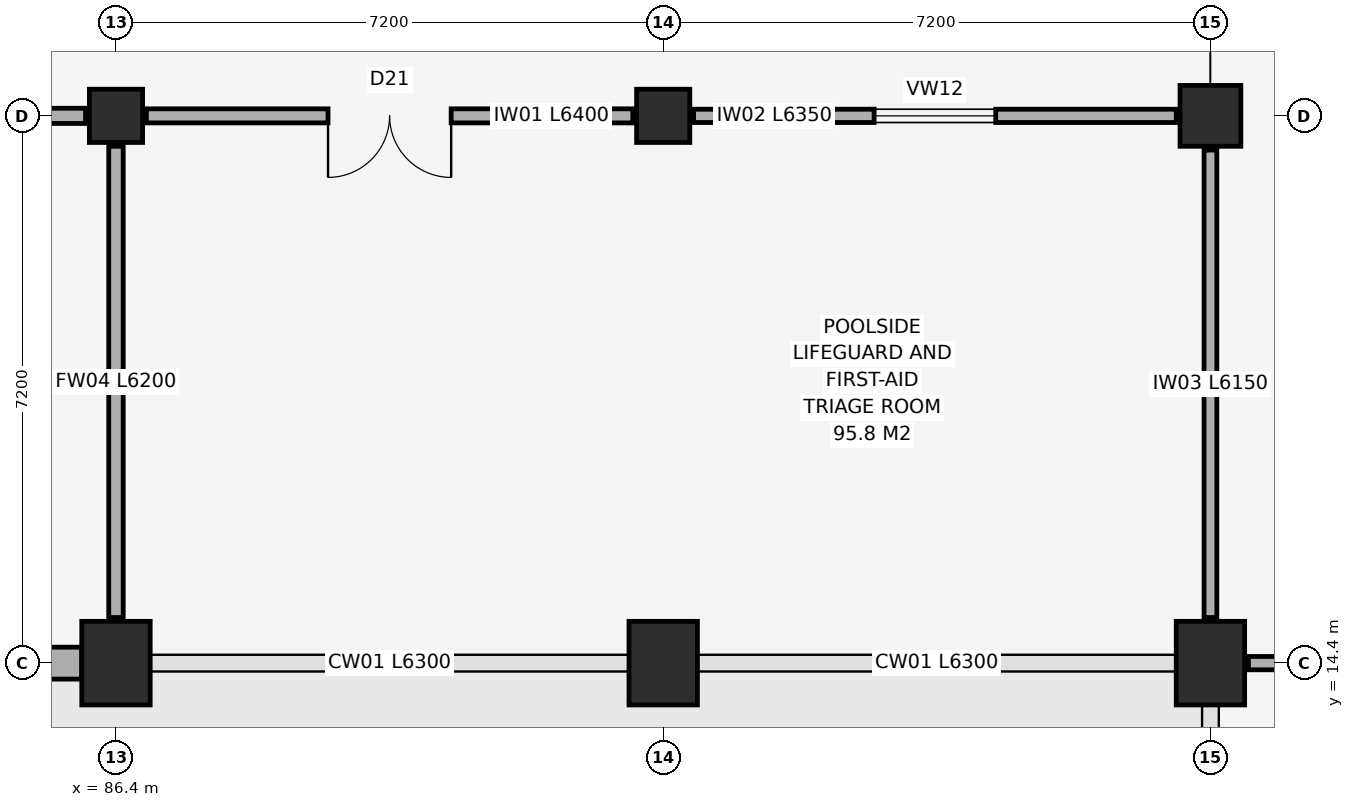
"""IFC4 building model, lengths in metres.
Left out: names, types, materials, properties, quantities, classifications, styles, units other than length and angle.
Written with IfcOpenShell. Run it as: python <this file> out.ifc"""

import sys

from ifc_helpers import new_model, si_unit, direction, frame, frame_2d, origin, origin_2d, place, context, subcontext, project, spatial, rectangle, circle, extrude, element, fill, save


model = new_model("IFC4")
c1 = context("Model", 3, precision=1e-05, world=origin(), true_north=direction((0.0, 1.0)))
c2 = subcontext(c1, "Body", "Model", "MODEL_VIEW")
j1 = project(units=[si_unit("LENGTHUNIT", "METRE"), si_unit("PLANEANGLEUNIT", "RADIAN")], contexts=[c1])
p1 = place(None, origin())
s1 = spatial("IfcSite", under=j1, at=p1, CompositionType="ELEMENT")
p2 = place(p1, origin())
s2 = spatial("IfcBuilding", under=s1, at=p2, CompositionType="ELEMENT")
p3 = place(p2, origin())
s3 = spatial("IfcBuildingStorey", under=s2, at=p3, CompositionType="ELEMENT", Elevation=0.0)
p4 = place(p3, frame((86.4, 14.4, 0.0), z_axis=(0.0, 0.0, 1.0), x_axis=(1.0, 0.0, 0.0)))
e1 = element("IfcColumn", 1, at=p4, inside=s3, PredefinedType="COLUMN", context=c2, shape_type="SweptSolid", body=[
    extrude(rectangle(XDim=0.9, YDim=1.1, at=origin_2d()), origin(), (0.0, 0.0, 1.0), 5.4),
])
p5 = place(p3, frame((86.4, 21.6, 0.0), z_axis=(0.0, 0.0, 1.0), x_axis=(1.0, 0.0, 0.0)))
e2 = element("IfcColumn", 2, at=p5, inside=s3, PredefinedType="COLUMN", context=c2, shape_type="SweptSolid", body=[
    extrude(rectangle(XDim=0.7, YDim=0.7, at=origin_2d()), origin(), (0.0, 0.0, 1.0), 5.4),
])
p6 = place(p3, frame((93.6, 14.4, 0.0), z_axis=(0.0, 0.0, 1.0), x_axis=(1.0, 0.0, 0.0)))
e3 = element("IfcColumn", 3, at=p6, inside=s3, PredefinedType="COLUMN", context=c2, shape_type="SweptSolid", body=[
    extrude(rectangle(XDim=0.9, YDim=1.1, at=origin_2d()), origin(), (0.0, 0.0, 1.0), 5.4),
])
p7 = place(p3, frame((93.6, 21.6, 0.0), z_axis=(0.0, 0.0, 1.0), x_axis=(1.0, 0.0, 0.0)))
e4 = element("IfcColumn", 4, at=p7, inside=s3, PredefinedType="COLUMN", context=c2, shape_type="SweptSolid", body=[
    extrude(rectangle(XDim=0.7, YDim=0.7, at=origin_2d()), origin(), (0.0, 0.0, 1.0), 5.4),
])
p8 = place(p3, frame((100.8, 14.4, 0.0), z_axis=(0.0, 0.0, 1.0), x_axis=(1.0, 0.0, 0.0)))
e5 = element("IfcColumn", 5, at=p8, inside=s3, PredefinedType="COLUMN", context=c2, shape_type="SweptSolid", body=[
    extrude(rectangle(XDim=0.9, YDim=1.1, at=origin_2d()), origin(), (0.0, 0.0, 1.0), 5.4),
])
p9 = place(p3, frame((100.8, 21.6, 0.0), z_axis=(0.0, 0.0, 1.0), x_axis=(1.0, 0.0, 0.0)))
e6 = element("IfcColumn", 6, at=p9, inside=s3, PredefinedType="COLUMN", context=c2, shape_type="SweptSolid", body=[
    extrude(circle(Radius=0.4, at=origin_2d()), origin(), (0.0, 0.0, 1.0), 5.4),
])
p10 = place(p3, frame((79.65, 14.4, 0.0), z_axis=(0.0, 0.0, 1.0), x_axis=(1.0, 0.0, 0.0)))
e7 = element("IfcWall", 7, at=p10, inside=s3, PredefinedType="SOLIDWALL", context=c2, shape_type="SweptSolid", body=[
    extrude(rectangle(XDim=6.3, YDim=0.42, at=frame_2d((3.15, 0.0))), origin(), (0.0, 0.0, 1.0), 4.64),
])
p11 = place(p10, frame((2.1, 0.0, 0.0)))
e8 = element("IfcOpeningElement", 8, at=p11, cuts=e7, PredefinedType="OPENING", context=c2, shape_type="SweptSolid", body=[
    extrude(rectangle(XDim=2.1, YDim=2.4, at=frame_2d((1.05, 1.2))), frame((0.0, 0.225, 0.0), z_axis=(0.0, -1.0, 0.0), x_axis=(1.0, 0.0, 0.0)), (0.0, 0.0, 1.0), 0.45),
])
p12 = place(p3, frame((101.3, 14.4, 0.0), z_axis=(0.0, 0.0, 1.0), x_axis=(1.0, 0.0, 0.0)))
e9 = element("IfcWall", 9, at=p12, inside=s3, PredefinedType="PARTITIONING", context=c2, shape_type="SweptSolid", body=[
    extrude(rectangle(XDim=13.4, YDim=0.175, at=frame_2d((6.7, 0.0))), origin(), (0.0, 0.0, 1.0), 5.14),
])
p13 = place(p12, frame((2.325, 0.0, 0.0)))
e10 = element("IfcOpeningElement", 10, at=p13, cuts=e9, PredefinedType="OPENING", context=c2, shape_type="SweptSolid", body=[
    extrude(rectangle(XDim=1.55, YDim=2.2, at=frame_2d((0.775, 1.1))), frame((0.0, 0.103, 0.0), z_axis=(0.0, -1.0, 0.0), x_axis=(1.0, 0.0, 0.0)), (0.0, 0.0, 1.0), 0.205),
])
p14 = place(p3, frame((79.6, 21.6, 0.0), z_axis=(0.0, 0.0, 1.0), x_axis=(1.0, 0.0, 0.0)))
e11 = element("IfcWall", 11, at=p14, inside=s3, PredefinedType="SOLIDWALL", context=c2, shape_type="SweptSolid", body=[
    extrude(rectangle(XDim=6.4, YDim=0.2, at=frame_2d((3.2, 0.0))), origin(), (0.0, 0.0, 1.0), 4.29),
])
p15 = place(p3, frame((86.4, 15.0, 0.0), z_axis=(0.0, 0.0, 1.0), x_axis=(0.0, 1.0, 0.0)))
e12 = element("IfcWall", 12, at=p15, inside=s3, PredefinedType="SOLIDWALL", context=c2, shape_type="SweptSolid", body=[
    extrude(rectangle(XDim=6.2, YDim=0.19, at=frame_2d((3.1, 0.0))), origin(), (0.0, 0.0, 1.0), 4.49),
])
p16 = place(p3, frame((86.8, 21.6, 0.0), z_axis=(0.0, 0.0, 1.0), x_axis=(1.0, 0.0, 0.0)))
e13 = element("IfcWall", 13, at=p16, inside=s3, PredefinedType="PARTITIONING", context=c2, shape_type="SweptSolid", body=[
    extrude(rectangle(XDim=6.4, YDim=0.185, at=frame_2d((3.2, 0.0))), origin(), (0.0, 0.0, 1.0), 4.29),
])
p17 = place(p16, frame((2.39, 0.0, 0.0)))
e14 = element("IfcOpeningElement", 14, at=p17, cuts=e13, PredefinedType="OPENING", context=c2, shape_type="SweptSolid", body=[
    extrude(rectangle(XDim=1.62, YDim=2.2, at=frame_2d((0.81, 1.1))), frame((0.0, 0.107, 0.0), z_axis=(0.0, -1.0, 0.0), x_axis=(1.0, 0.0, 0.0)), (0.0, 0.0, 1.0), 0.215),
])
p18 = place(p3, frame((94.0, 21.6, 0.0), z_axis=(0.0, 0.0, 1.0), x_axis=(1.0, 0.0, 0.0)))
e15 = element("IfcWall", 15, at=p18, inside=s3, PredefinedType="PARTITIONING", context=c2, shape_type="SweptSolid", body=[
    extrude(rectangle(XDim=6.35, YDim=0.175, at=frame_2d((3.175, 0.0))), origin(), (0.0, 0.0, 1.0), 4.29),
])
p19 = place(p18, frame((2.375, 0.0, 0.95)))
e16 = element("IfcOpeningElement", 16, at=p19, cuts=e15, PredefinedType="OPENING", context=c2, shape_type="SweptSolid", body=[
    extrude(rectangle(XDim=1.6, YDim=1.2, at=frame_2d((0.8, 0.6))), frame((0.0, 0.103, 0.0), z_axis=(0.0, -1.0, 0.0), x_axis=(1.0, 0.0, 0.0)), (0.0, 0.0, 1.0), 0.205),
])
p20 = place(p3, frame((100.8, 15.0, 0.0), z_axis=(0.0, 0.0, 1.0), x_axis=(0.0, 1.0, 0.0)))
e17 = element("IfcWall", 17, at=p20, inside=s3, PredefinedType="PARTITIONING", context=c2, shape_type="SweptSolid", body=[
    extrude(rectangle(XDim=6.15, YDim=0.168, at=frame_2d((3.075, 0.0))), origin(), (0.0, 0.0, 1.0), 4.49),
])
p21 = place(p17, frame((1.62, 0.0, 0.0), z_axis=(0.0, 0.0, 1.0), x_axis=(-1.0, 0.0, 0.0)))
e18 = element("IfcDoor", 18, at=p21, inside=s3, OperationType="DOUBLE_SWING_LEFT", PredefinedType="DOOR", context=c2, shape_type="SweptSolid", body=[
    extrude(rectangle(XDim=1.62, YDim=2.2, at=frame_2d((0.81, 1.1))), frame((0.0, 0.025, 0.0), z_axis=(0.0, -1.0, 0.0), x_axis=(1.0, 0.0, 0.0)), (0.0, 0.0, 1.0), 0.05),
])
fill(e14, e18)
p22 = place(p19, origin())
e19 = element("IfcWindow", 19, at=p22, inside=s3, PartitioningType="SINGLE_PANEL", PredefinedType="WINDOW", context=c2, shape_type="SweptSolid", body=[
    extrude(rectangle(XDim=1.6, YDim=1.2, at=frame_2d((0.8, 0.6))), frame((0.0, 0.03, 0.0), z_axis=(0.0, -1.0, 0.0), x_axis=(1.0, 0.0, 0.0)), (0.0, 0.0, 1.0), 0.06),
])
fill(e16, e19)
save(model, sys.argv[1])
